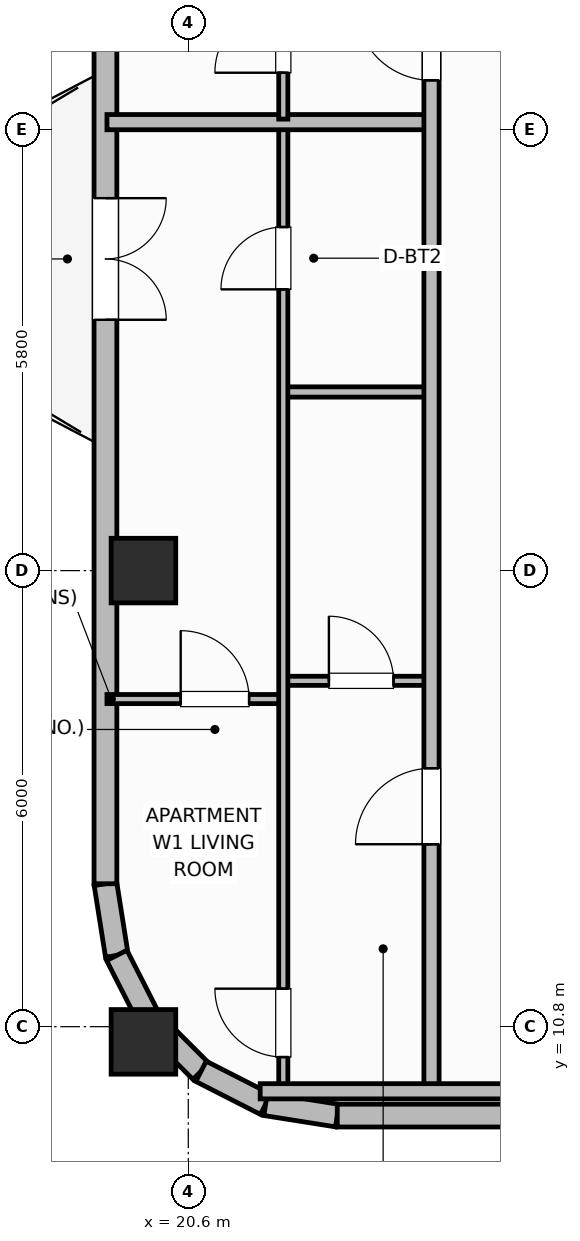
"""IFC4 building model, lengths in metres.
Left out: names, types, materials, properties, quantities, classifications, styles, units other than length and angle.
Written with IfcOpenShell. Run it as: python <this file> out.ifc"""

import sys

from ifc_helpers import new_model, si_unit, direction, frame, frame_2d, origin, origin_2d, place, context, subcontext, project, spatial, rectangle, extrude, element, fill, save


model = new_model("IFC4")
c1 = context("Model", 3, precision=1e-05, world=origin(), true_north=direction((0.0, 1.0)))
c2 = subcontext(c1, "Body", "Model", "MODEL_VIEW")
j1 = project(units=[si_unit("LENGTHUNIT", "METRE"), si_unit("PLANEANGLEUNIT", "RADIAN")], contexts=[c1])
p1 = place(None, origin())
s1 = spatial("IfcSite", under=j1, at=p1, CompositionType="ELEMENT")
p2 = place(p1, origin())
s2 = spatial("IfcBuilding", under=s1, at=p2, CompositionType="ELEMENT")
p3 = place(p2, frame((0.0, 0.0, 244.3)))
s3 = spatial("IfcBuildingStorey", under=s2, at=p3, CompositionType="ELEMENT", Elevation=244.3)
for number, where, z_axis, x_axis in (
    (1, (20.01, 10.6, 0.0), (0.0, 0.0, 1.0), (1.0, 0.0, 0.0)),
    (2, (20.01, 16.8, 0.0), (0.0, 0.0, 1.0), (1.0, 0.0, 0.0)),
):
    element("IfcColumn", number, at=place(p3, frame(where, z_axis=z_axis, x_axis=x_axis)), inside=s3, PredefinedType="COLUMN", context=c2, shape_type="SweptSolid", body=[
        extrude(rectangle(XDim=0.85, YDim=0.85, at=origin_2d()), origin(), (0.0, 0.0, 1.0), 3.7),
    ])
p4 = place(p3, frame((19.51, 12.68, 0.0), z_axis=(0.0, 0.0, 1.0), x_axis=(0.156343617883, -0.987702725088, 0.0)))
e3 = element("IfcWall", 3, at=p4, inside=s3, PredefinedType="SOLIDWALL", context=c2, shape_type="SweptSolid", body=[
    extrude(rectangle(XDim=0.954, YDim=0.3, at=frame_2d((0.477, 0.0))), origin(), (0.0, 0.0, 1.0), 2.73),
])
for number, where, z_axis, x_axis in (
    (4, (19.659, 11.738, 0.0), (0.0, 0.0, 1.0), (0.454, -0.891, 0.0)),
    (5, (20.093, 10.887, 0.0), (0.0, 0.0, 1.0), (0.707, -0.707, 0.0)),
):
    element("IfcWall", number, at=place(p3, frame(where, z_axis=z_axis, x_axis=x_axis)), inside=s3, PredefinedType="SOLIDWALL", context=c2, shape_type="SweptSolid", body=[
        extrude(rectangle(XDim=0.954, YDim=0.3, at=frame_2d((0.477, 0.0))), origin(), (0.0, 0.0, 1.0), 2.73),
    ])
p5 = place(p3, frame((20.767, 10.212, 0.0), z_axis=(0.0, 0.0, 1.0), x_axis=(0.891023873617, -0.45395644796, 0.0)))
e6 = element("IfcWall", 6, at=p5, inside=s3, PredefinedType="SOLIDWALL", context=c2, shape_type="SweptSolid", body=[
    extrude(rectangle(XDim=0.954, YDim=0.3, at=frame_2d((0.477, 0.0))), origin(), (0.0, 0.0, 1.0), 2.73),
])
p6 = place(p3, frame((21.617, 9.779, 0.0), z_axis=(0.0, 0.0, 1.0), x_axis=(0.987669453596, -0.156553666304, 0.0)))
e7 = element("IfcWall", 7, at=p6, inside=s3, PredefinedType="SOLIDWALL", context=c2, shape_type="SweptSolid", body=[
    extrude(rectangle(XDim=0.954, YDim=0.3, at=frame_2d((0.477, 0.0))), origin(), (0.0, 0.0, 1.0), 2.73),
])
p7 = place(p3, frame((22.56, 9.63, 0.0), z_axis=(0.0, 0.0, 1.0), x_axis=(1.0, 0.0, 0.0)))
e8 = element("IfcWall", 8, at=p7, inside=s3, PredefinedType="SOLIDWALL", context=c2, shape_type="SweptSolid", body=[
    extrude(rectangle(XDim=33.28, YDim=0.3, at=frame_2d((16.64, 0.0))), origin(), (0.0, 0.0, 1.0), 2.73),
])
p8 = place(p7, frame((4.647, 0.0, 0.71)))
e9 = element("IfcOpeningElement", 9, at=p8, cuts=e8, PredefinedType="OPENING", context=c2, shape_type="SweptSolid", body=[
    extrude(rectangle(XDim=1.6, YDim=1.9, at=frame_2d((0.8, 0.95))), frame((0.0, 0.16, 0.0), z_axis=(0.0, -1.0, 0.0), x_axis=(1.0, 0.0, 0.0)), (0.0, 0.0, 1.0), 0.32),
])
p9 = place(p7, frame((7.845, 0.0, 0.71)))
e10 = element("IfcOpeningElement", 10, at=p9, cuts=e8, PredefinedType="OPENING", context=c2, shape_type="SweptSolid", body=[
    extrude(rectangle(XDim=1.6, YDim=1.9, at=frame_2d((0.8, 0.95))), frame((0.0, 0.16, 0.0), z_axis=(0.0, -1.0, 0.0), x_axis=(1.0, 0.0, 0.0)), (0.0, 0.0, 1.0), 0.32),
])
p10 = place(p7, frame((14.241, 0.0, 0.71)))
e11 = element("IfcOpeningElement", 11, at=p10, cuts=e8, PredefinedType="OPENING", context=c2, shape_type="SweptSolid", body=[
    extrude(rectangle(XDim=1.6, YDim=1.9, at=frame_2d((0.8, 0.95))), frame((0.0, 0.16, 0.0), z_axis=(0.0, -1.0, 0.0), x_axis=(1.0, 0.0, 0.0)), (0.0, 0.0, 1.0), 0.32),
])
p11 = place(p7, frame((17.439, 0.0, 0.71)))
e12 = element("IfcOpeningElement", 12, at=p11, cuts=e8, PredefinedType="OPENING", context=c2, shape_type="SweptSolid", body=[
    extrude(rectangle(XDim=1.6, YDim=1.9, at=frame_2d((0.8, 0.95))), frame((0.0, 0.16, 0.0), z_axis=(0.0, -1.0, 0.0), x_axis=(1.0, 0.0, 0.0)), (0.0, 0.0, 1.0), 0.32),
])
p12 = place(p7, frame((23.835, 0.0, 0.71)))
e13 = element("IfcOpeningElement", 13, at=p12, cuts=e8, PredefinedType="OPENING", context=c2, shape_type="SweptSolid", body=[
    extrude(rectangle(XDim=1.6, YDim=1.9, at=frame_2d((0.8, 0.95))), frame((0.0, 0.16, 0.0), z_axis=(0.0, -1.0, 0.0), x_axis=(1.0, 0.0, 0.0)), (0.0, 0.0, 1.0), 0.32),
])
p13 = place(p7, frame((27.033, 0.0, 0.71)))
e14 = element("IfcOpeningElement", 14, at=p13, cuts=e8, PredefinedType="OPENING", context=c2, shape_type="SweptSolid", body=[
    extrude(rectangle(XDim=1.6, YDim=1.9, at=frame_2d((0.8, 0.95))), frame((0.0, 0.16, 0.0), z_axis=(0.0, -1.0, 0.0), x_axis=(1.0, 0.0, 0.0)), (0.0, 0.0, 1.0), 0.32),
])
p14 = place(p3, frame((19.51, 23.8, 0.0), z_axis=(0.0, 0.0, 1.0), x_axis=(0.0, -1.0, 0.0)))
e15 = element("IfcWall", 15, at=p14, inside=s3, PredefinedType="SOLIDWALL", context=c2, shape_type="SweptSolid", body=[
    extrude(rectangle(XDim=11.12, YDim=0.3, at=frame_2d((5.56, 0.0))), origin(), (0.0, 0.0, 1.0), 2.73),
])
p15 = place(p14, frame((2.1, 0.0, 0.0)))
e16 = element("IfcOpeningElement", 16, at=p15, cuts=e15, PredefinedType="OPENING", context=c2, shape_type="SweptSolid", body=[
    extrude(rectangle(XDim=1.6, YDim=2.1, at=frame_2d((0.8, 1.05))), frame((0.0, 0.16, 0.0), z_axis=(0.0, -1.0, 0.0), x_axis=(1.0, 0.0, 0.0)), (0.0, 0.0, 1.0), 0.32),
])
p16 = place(p3, frame((21.85, 15.35, 0.0), z_axis=(0.0, 0.0, 1.0), x_axis=(1.0, 0.0, 0.0)))
e17 = element("IfcWall", 17, at=p16, inside=s3, PredefinedType="PARTITIONING", context=c2, shape_type="SweptSolid", body=[
    extrude(rectangle(XDim=1.95, YDim=0.12, at=frame_2d((0.975, 0.0))), origin(), (0.0, 0.0, 1.0), 2.56),
])
p17 = place(p16, frame((0.6, 0.0, 0.0)))
e18 = element("IfcOpeningElement", 18, at=p17, cuts=e17, PredefinedType="OPENING", context=c2, shape_type="SweptSolid", body=[
    extrude(rectangle(XDim=0.85, YDim=2.1, at=frame_2d((0.425, 1.05))), frame((0.0, 0.07, 0.0), z_axis=(0.0, -1.0, 0.0), x_axis=(1.0, 0.0, 0.0)), (0.0, 0.0, 1.0), 0.14),
])
p18 = place(p3, frame((21.85, 19.15, 0.0), z_axis=(0.0, 0.0, 1.0), x_axis=(1.0, 0.0, 0.0)))
e19 = element("IfcWall", 19, at=p18, inside=s3, PredefinedType="PARTITIONING", context=c2, shape_type="SweptSolid", body=[
    extrude(rectangle(XDim=1.95, YDim=0.135, at=frame_2d((0.975, 0.0))), origin(), (0.0, 0.0, 1.0), 2.56),
])
p19 = place(p3, frame((19.53, 15.11, 0.0), z_axis=(0.0, 0.0, 1.0), x_axis=(1.0, 0.0, 0.0)))
e20 = element("IfcWall", 20, at=p19, inside=s3, PredefinedType="PARTITIONING", context=c2, shape_type="SweptSolid", body=[
    extrude(rectangle(XDim=2.32, YDim=0.12, at=frame_2d((1.16, 0.0))), origin(), (0.0, 0.0, 1.0), 2.56),
])
p20 = place(p19, frame((0.97, 0.0, 0.0)))
e21 = element("IfcOpeningElement", 21, at=p20, cuts=e20, PredefinedType="OPENING", context=c2, shape_type="SweptSolid", body=[
    extrude(rectangle(XDim=0.9, YDim=2.1, at=frame_2d((0.45, 1.05))), frame((0.0, 0.07, 0.0), z_axis=(0.0, -1.0, 0.0), x_axis=(1.0, 0.0, 0.0)), (0.0, 0.0, 1.0), 0.14),
])
p21 = place(p3, frame((21.85, 9.99, 0.0), z_axis=(0.0, 0.0, 1.0), x_axis=(0.0, 1.0, 0.0)))
e22 = element("IfcWall", 22, at=p21, inside=s3, PredefinedType="PARTITIONING", context=c2, shape_type="SweptSolid", body=[
    extrude(rectangle(XDim=12.67, YDim=0.12, at=frame_2d((6.335, 0.0))), origin(), (0.0, 0.0, 1.0), 2.56),
])
p22 = place(p21, frame((0.41, 0.0, 0.0)))
e23 = element("IfcOpeningElement", 23, at=p22, cuts=e22, PredefinedType="OPENING", context=c2, shape_type="SweptSolid", body=[
    extrude(rectangle(XDim=0.9, YDim=2.1, at=frame_2d((0.45, 1.05))), frame((0.0, 0.07, 0.0), z_axis=(0.0, -1.0, 0.0), x_axis=(1.0, 0.0, 0.0)), (0.0, 0.0, 1.0), 0.14),
])
p23 = place(p21, frame((10.51, 0.0, 0.0)))
e24 = element("IfcOpeningElement", 24, at=p23, cuts=e22, PredefinedType="OPENING", context=c2, shape_type="SweptSolid", body=[
    extrude(rectangle(XDim=0.82, YDim=2.08, at=frame_2d((0.41, 1.04))), frame((0.0, 0.07, 0.0), z_axis=(0.0, -1.0, 0.0), x_axis=(1.0, 0.0, 0.0)), (0.0, 0.0, 1.0), 0.14),
])
p24 = place(p3, frame((19.53, 22.7, 0.0), z_axis=(0.0, 0.0, 1.0), x_axis=(1.0, 0.0, 0.0)))
e25 = element("IfcWall", 25, at=p24, inside=s3, PredefinedType="PARTITIONING", context=c2, shape_type="SweptSolid", body=[
    extrude(rectangle(XDim=4.27, YDim=0.2, at=frame_2d((2.135, 0.0))), origin(), (0.0, 0.0, 1.0), 2.56),
])
p25 = place(p3, frame((21.85, 22.74, 0.0), z_axis=(0.0, 0.0, 1.0), x_axis=(0.0, 1.0, 0.0)))
e26 = element("IfcWall", 26, at=p25, inside=s3, PredefinedType="PARTITIONING", context=c2, shape_type="SweptSolid", body=[
    extrude(rectangle(XDim=11.625, YDim=0.12, at=frame_2d((5.812, 0.0))), origin(), (0.0, 0.0, 1.0), 2.56),
])
p26 = place(p25, frame((0.61, 0.0, 0.0)))
e27 = element("IfcOpeningElement", 27, at=p26, cuts=e26, PredefinedType="OPENING", context=c2, shape_type="SweptSolid", body=[
    extrude(rectangle(XDim=0.9, YDim=2.1, at=frame_2d((0.45, 1.05))), frame((0.0, 0.07, 0.0), z_axis=(0.0, -1.0, 0.0), x_axis=(1.0, 0.0, 0.0)), (0.0, 0.0, 1.0), 0.14),
])
p27 = place(p3, frame((23.8, 9.95, 0.0), z_axis=(0.0, 0.0, 1.0), x_axis=(0.0, 1.0, 0.0)))
e28 = element("IfcWall", 28, at=p27, inside=s3, PredefinedType="PARTITIONING", context=c2, shape_type="SweptSolid", body=[
    extrude(rectangle(XDim=36.5, YDim=0.2, at=frame_2d((18.25, 0.0))), origin(), (0.0, 0.0, 1.0), 2.56),
])
p28 = place(p27, frame((3.25, 0.0, 0.0)))
e29 = element("IfcOpeningElement", 29, at=p28, cuts=e28, PredefinedType="OPENING", context=c2, shape_type="SweptSolid", body=[
    extrude(rectangle(XDim=1.0, YDim=2.15, at=frame_2d((0.5, 1.075))), frame((0.0, 0.11, 0.0), z_axis=(0.0, -1.0, 0.0), x_axis=(1.0, 0.0, 0.0)), (0.0, 0.0, 1.0), 0.22),
])
p29 = place(p27, frame((13.3, 0.0, 0.0)))
e30 = element("IfcOpeningElement", 30, at=p29, cuts=e28, PredefinedType="OPENING", context=c2, shape_type="SweptSolid", body=[
    extrude(rectangle(XDim=1.0, YDim=2.15, at=frame_2d((0.5, 1.075))), frame((0.0, 0.11, 0.0), z_axis=(0.0, -1.0, 0.0), x_axis=(1.0, 0.0, 0.0)), (0.0, 0.0, 1.0), 0.22),
])
p30 = place(p27, frame((25.005, 0.0, 0.0)))
e31 = element("IfcOpeningElement", 31, at=p30, cuts=e28, PredefinedType="OPENING", context=c2, shape_type="SweptSolid", body=[
    extrude(rectangle(XDim=1.0, YDim=2.15, at=frame_2d((0.5, 1.075))), frame((0.0, 0.11, 0.0), z_axis=(0.0, -1.0, 0.0), x_axis=(1.0, 0.0, 0.0)), (0.0, 0.0, 1.0), 0.22),
])
p31 = place(p3, frame((21.546, 9.95, 0.0), z_axis=(0.0, 0.0, 1.0), x_axis=(1.0, 0.0, 0.0)))
e32 = element("IfcWall", 32, at=p31, inside=s3, PredefinedType="PARTITIONING", context=c2, shape_type="SweptSolid", body=[
    extrude(rectangle(XDim=3.754, YDim=0.2, at=frame_2d((1.877, 0.0))), origin(), (0.0, 0.0, 1.0), 2.56),
])
p32 = place(p15, origin())
e33 = element("IfcDoor", 33, at=p32, inside=s3, OperationType="DOUBLE_DOOR_SINGLE_SWING", PredefinedType="DOOR", context=c2, shape_type="SweptSolid", body=[
    extrude(rectangle(XDim=1.6, YDim=2.1, at=frame_2d((0.8, 1.05))), frame((0.0, 0.025, 0.0), z_axis=(0.0, -1.0, 0.0), x_axis=(1.0, 0.0, 0.0)), (0.0, 0.0, 1.0), 0.05),
])
fill(e16, e33)
p33 = place(p17, origin())
e34 = element("IfcDoor", 34, at=p33, inside=s3, OperationType="SINGLE_SWING_LEFT", PredefinedType="DOOR", context=c2, shape_type="SweptSolid", body=[
    extrude(rectangle(XDim=0.85, YDim=2.1, at=frame_2d((0.425, 1.05))), frame((0.0, 0.025, 0.0), z_axis=(0.0, -1.0, 0.0), x_axis=(1.0, 0.0, 0.0)), (0.0, 0.0, 1.0), 0.05),
])
fill(e18, e34)
p34 = place(p20, origin())
e35 = element("IfcDoor", 35, at=p34, inside=s3, OperationType="SINGLE_SWING_LEFT", PredefinedType="DOOR", context=c2, shape_type="SweptSolid", body=[
    extrude(rectangle(XDim=0.9, YDim=2.1, at=frame_2d((0.45, 1.05))), frame((0.0, 0.025, 0.0), z_axis=(0.0, -1.0, 0.0), x_axis=(1.0, 0.0, 0.0)), (0.0, 0.0, 1.0), 0.05),
])
fill(e21, e35)
p35 = place(p22, origin())
e36 = element("IfcDoor", 36, at=p35, inside=s3, OperationType="SINGLE_SWING_RIGHT", PredefinedType="DOOR", context=c2, shape_type="SweptSolid", body=[
    extrude(rectangle(XDim=0.9, YDim=2.1, at=frame_2d((0.45, 1.05))), frame((0.0, 0.025, 0.0), z_axis=(0.0, -1.0, 0.0), x_axis=(1.0, 0.0, 0.0)), (0.0, 0.0, 1.0), 0.05),
])
fill(e23, e36)
p36 = place(p23, origin())
e37 = element("IfcDoor", 37, at=p36, inside=s3, OperationType="SINGLE_SWING_LEFT", PredefinedType="DOOR", context=c2, shape_type="SweptSolid", body=[
    extrude(rectangle(XDim=0.82, YDim=2.08, at=frame_2d((0.41, 1.04))), frame((0.0, 0.025, 0.0), z_axis=(0.0, -1.0, 0.0), x_axis=(1.0, 0.0, 0.0)), (0.0, 0.0, 1.0), 0.05),
])
fill(e24, e37)
p37 = place(p26, origin())
e38 = element("IfcDoor", 38, at=p37, inside=s3, OperationType="SINGLE_SWING_LEFT", PredefinedType="DOOR", context=c2, shape_type="SweptSolid", body=[
    extrude(rectangle(XDim=0.9, YDim=2.1, at=frame_2d((0.45, 1.05))), frame((0.0, 0.025, 0.0), z_axis=(0.0, -1.0, 0.0), x_axis=(1.0, 0.0, 0.0)), (0.0, 0.0, 1.0), 0.05),
])
fill(e27, e38)
p38 = place(p28, origin())
e39 = element("IfcDoor", 39, at=p38, inside=s3, OperationType="SINGLE_SWING_LEFT", PredefinedType="DOOR", context=c2, shape_type="SweptSolid", body=[
    extrude(rectangle(XDim=1.0, YDim=2.15, at=frame_2d((0.5, 1.075))), frame((0.0, 0.025, 0.0), z_axis=(0.0, -1.0, 0.0), x_axis=(1.0, 0.0, 0.0)), (0.0, 0.0, 1.0), 0.05),
])
fill(e29, e39)
p39 = place(p29, origin())
e40 = element("IfcDoor", 40, at=p39, inside=s3, OperationType="SINGLE_SWING_RIGHT", PredefinedType="DOOR", context=c2, shape_type="SweptSolid", body=[
    extrude(rectangle(XDim=1.0, YDim=2.15, at=frame_2d((0.5, 1.075))), frame((0.0, 0.025, 0.0), z_axis=(0.0, -1.0, 0.0), x_axis=(1.0, 0.0, 0.0)), (0.0, 0.0, 1.0), 0.05),
])
fill(e30, e40)
save(model, sys.argv[1])
